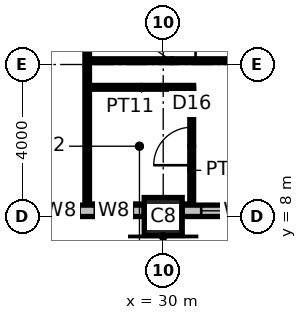
"""IFC4 building model, lengths in metres.
Left out: names, types, materials, properties, quantities, classifications, styles, units other than length and angle.
Written with IfcOpenShell. Run it as: python <this file> out.ifc"""

import sys

from ifc_helpers import new_model, si_unit, direction, frame, frame_2d, origin, origin_2d, place, context, subcontext, project, spatial, rectangle, hollow_rectangle, extrude, element, fill, save


model = new_model("IFC4")
c1 = context("Model", 3, precision=1e-05, world=origin(), true_north=direction((0.0, 1.0)))
c2 = subcontext(c1, "Body", "Model", "MODEL_VIEW")
j1 = project(units=[si_unit("LENGTHUNIT", "METRE"), si_unit("PLANEANGLEUNIT", "RADIAN")], contexts=[c1])
p1 = place(None, origin())
s1 = spatial("IfcSite", under=j1, at=p1, CompositionType="ELEMENT")
p2 = place(p1, origin())
s2 = spatial("IfcBuilding", under=s1, at=p2, CompositionType="ELEMENT")
p3 = place(p2, frame((0.0, 0.0, 234.2)))
s3 = spatial("IfcBuildingStorey", under=s2, at=p3, CompositionType="ELEMENT", Elevation=234.2)
p4 = place(p3, frame((30.0, 8.0, 0.0), z_axis=(0.0, 0.0, 1.0), x_axis=(1.0, 0.0, 0.0)))
e1 = element("IfcColumn", 1, at=p4, inside=s3, PredefinedType="COLUMN", context=c2, shape_type="SweptSolid", body=[
    extrude(hollow_rectangle(XDim=1.0, YDim=1.0, WallThickness=0.125, at=origin_2d()), origin(), (0.0, 0.0, 1.0), 4.0),
])
p5 = place(p3, frame((28.0, 8.3, 0.0), z_axis=(0.0, 0.0, 1.0), x_axis=(0.0, 1.0, 0.0)))
e2 = element("IfcWall", 2, at=p5, inside=s3, PredefinedType="PARTITIONING", context=c2, shape_type="SweptSolid", body=[
    extrude(rectangle(XDim=7.325, YDim=0.12, at=frame_2d((3.663, 0.0))), origin(), (0.0, 0.0, 1.0), 3.85),
])
p6 = place(p3, frame((28.06, 11.4, 0.0), z_axis=(0.0, 0.0, 1.0), x_axis=(1.0, 0.0, 0.0)))
e3 = element("IfcWall", 3, at=p6, inside=s3, PredefinedType="PARTITIONING", context=c2, shape_type="SweptSolid", body=[
    extrude(rectangle(XDim=2.74, YDim=0.1, at=frame_2d((1.37, 0.0))), origin(), (0.0, 0.0, 1.0), 3.85),
])
p7 = place(p3, frame((28.061, 12.1, 0.0), z_axis=(0.0, 0.0, 1.0), x_axis=(1.0, 0.0, 0.0)))
e4 = element("IfcWall", 4, at=p7, inside=s3, PredefinedType="PARTITIONING", context=c2, shape_type="SweptSolid", body=[
    extrude(rectangle(XDim=7.19, YDim=0.1, at=frame_2d((3.595, 0.0))), origin(), (0.0, 0.0, 1.0), 3.85),
])
p8 = place(p7, frame((2.79, 0.0, 0.0)))
e5 = element("IfcOpeningElement", 5, at=p8, cuts=e4, PredefinedType="OPENING", context=c2, shape_type="SweptSolid", body=[
    extrude(rectangle(XDim=1.8, YDim=2.4, at=frame_2d((0.9, 1.2))), frame((0.0, 0.06, 0.0), z_axis=(0.0, -1.0, 0.0), x_axis=(1.0, 0.0, 0.0)), (0.0, 0.0, 1.0), 0.12),
])
p9 = place(p3, frame((30.75, 8.3, 0.0), z_axis=(0.0, 0.0, 1.0), x_axis=(0.0, 1.0, 0.0)))
e6 = element("IfcWall", 6, at=p9, inside=s3, PredefinedType="PARTITIONING", context=c2, shape_type="SweptSolid", body=[
    extrude(rectangle(XDim=3.05, YDim=0.1, at=frame_2d((1.525, 0.0))), origin(), (0.0, 0.0, 1.0), 3.85),
])
p10 = place(p9, frame((1.05, 0.0, 0.0)))
e7 = element("IfcOpeningElement", 7, at=p10, cuts=e6, PredefinedType="OPENING", context=c2, shape_type="SweptSolid", body=[
    extrude(rectangle(XDim=1.0, YDim=2.2, at=frame_2d((0.5, 1.1))), frame((0.0, 0.06, 0.0), z_axis=(0.0, -1.0, 0.0), x_axis=(1.0, 0.0, 0.0)), (0.0, 0.0, 1.0), 0.12),
])
p11 = place(p3, frame((26.5, 8.15, 0.0), z_axis=(0.0, 0.0, 1.0), x_axis=(1.0, 0.0, 0.0)))
e8 = element("IfcWall", 8, at=p11, inside=s3, PredefinedType="ELEMENTEDWALL", context=c2, shape_type="SweptSolid", body=[
    extrude(rectangle(XDim=3.0, YDim=0.3, at=frame_2d((1.5, 0.0))), origin(), (0.0, 0.0, 1.0), 2.65),
])
p12 = place(p11, frame((0.3, 0.0, 0.8)))
e9 = element("IfcOpeningElement", 9, at=p12, cuts=e8, PredefinedType="OPENING", context=c2, shape_type="SweptSolid", body=[
    extrude(rectangle(XDim=1.0, YDim=1.8, at=frame_2d((0.5, 0.9))), frame((0.0, 0.16, 0.0), z_axis=(0.0, -1.0, 0.0), x_axis=(1.0, 0.0, 0.0)), (0.0, 0.0, 1.0), 0.32),
])
p13 = place(p11, frame((1.7, 0.0, 0.8)))
e10 = element("IfcOpeningElement", 10, at=p13, cuts=e8, PredefinedType="OPENING", context=c2, shape_type="SweptSolid", body=[
    extrude(rectangle(XDim=1.0, YDim=1.8, at=frame_2d((0.5, 0.9))), frame((0.0, 0.16, 0.0), z_axis=(0.0, -1.0, 0.0), x_axis=(1.0, 0.0, 0.0)), (0.0, 0.0, 1.0), 0.32),
])
p14 = place(p3, frame((30.5, 8.15, 0.0), z_axis=(0.0, 0.0, 1.0), x_axis=(1.0, 0.0, 0.0)))
e11 = element("IfcWall", 11, at=p14, inside=s3, PredefinedType="ELEMENTEDWALL", context=c2, shape_type="SweptSolid", body=[
    extrude(rectangle(XDim=3.0, YDim=0.3, at=frame_2d((1.5, 0.0))), origin(), (0.0, 0.0, 1.0), 2.65),
])
p15 = place(p14, frame((0.5, 0.0, 0.8)))
e12 = element("IfcOpeningElement", 12, at=p15, cuts=e11, PredefinedType="OPENING", context=c2, shape_type="SweptSolid", body=[
    extrude(rectangle(XDim=2.0, YDim=1.8, at=frame_2d((1.0, 0.9))), frame((0.0, 0.16, 0.0), z_axis=(0.0, -1.0, 0.0), x_axis=(1.0, 0.0, 0.0)), (0.0, 0.0, 1.0), 0.32),
])
p16 = place(p8, origin())
e13 = element("IfcDoor", 13, at=p16, inside=s3, OperationType="DOUBLE_DOOR_DOUBLE_SWING", PredefinedType="DOOR", context=c2, shape_type="SweptSolid", body=[
    extrude(rectangle(XDim=1.8, YDim=2.4, at=frame_2d((0.9, 1.2))), frame((0.0, 0.025, 0.0), z_axis=(0.0, -1.0, 0.0), x_axis=(1.0, 0.0, 0.0)), (0.0, 0.0, 1.0), 0.05),
])
fill(e5, e13)
p17 = place(p10, origin())
e14 = element("IfcDoor", 14, at=p17, inside=s3, OperationType="SINGLE_SWING_LEFT", PredefinedType="DOOR", context=c2, shape_type="SweptSolid", body=[
    extrude(rectangle(XDim=1.0, YDim=2.2, at=frame_2d((0.5, 1.1))), frame((0.0, 0.025, 0.0), z_axis=(0.0, -1.0, 0.0), x_axis=(1.0, 0.0, 0.0)), (0.0, 0.0, 1.0), 0.05),
])
fill(e7, e14)
p18 = place(p12, origin())
e15 = element("IfcWindow", 15, at=p18, inside=s3, PartitioningType="SINGLE_PANEL", PredefinedType="WINDOW", context=c2, shape_type="SweptSolid", body=[
    extrude(rectangle(XDim=1.0, YDim=1.8, at=frame_2d((0.5, 0.9))), frame((0.0, 0.03, 0.0), z_axis=(0.0, -1.0, 0.0), x_axis=(1.0, 0.0, 0.0)), (0.0, 0.0, 1.0), 0.06),
])
fill(e9, e15)
p19 = place(p13, origin())
e16 = element("IfcWindow", 16, at=p19, inside=s3, PartitioningType="SINGLE_PANEL", PredefinedType="WINDOW", context=c2, shape_type="SweptSolid", body=[
    extrude(rectangle(XDim=1.0, YDim=1.8, at=frame_2d((0.5, 0.9))), frame((0.0, 0.03, 0.0), z_axis=(0.0, -1.0, 0.0), x_axis=(1.0, 0.0, 0.0)), (0.0, 0.0, 1.0), 0.06),
])
fill(e10, e16)
p20 = place(p15, origin())
e17 = element("IfcWindow", 17, at=p20, inside=s3, PartitioningType="SINGLE_PANEL", PredefinedType="WINDOW", context=c2, shape_type="SweptSolid", body=[
    extrude(rectangle(XDim=2.0, YDim=1.8, at=frame_2d((1.0, 0.9))), frame((0.0, 0.03, 0.0), z_axis=(0.0, -1.0, 0.0), x_axis=(1.0, 0.0, 0.0)), (0.0, 0.0, 1.0), 0.06),
])
fill(e12, e17)
save(model, sys.argv[1])
